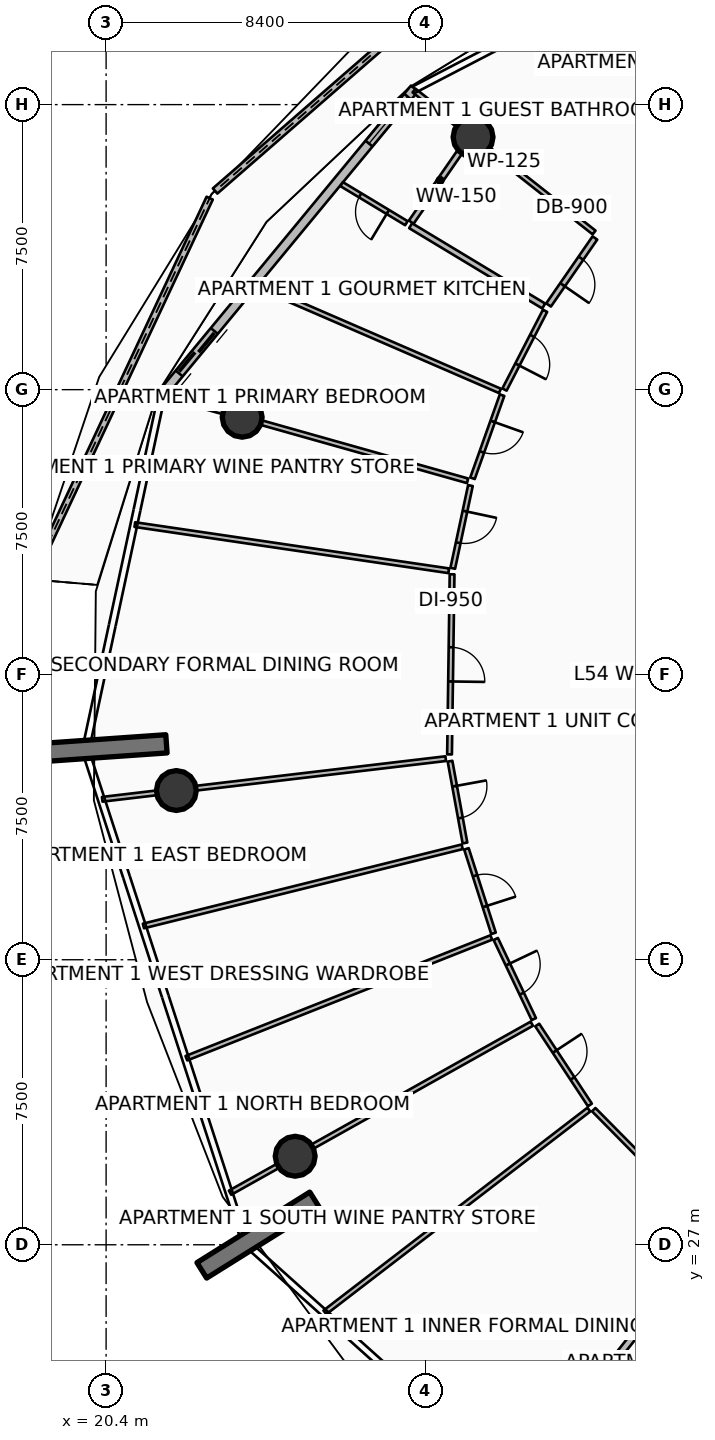
"""IFC4 building model, lengths in metres.
Left out: names, types, materials, properties, quantities, classifications, styles, units other than length and angle.
Written with IfcOpenShell. Run it as: python <this file> out.ifc"""

import sys

from ifc_helpers import new_model, si_unit, direction, frame, frame_2d, origin, origin_2d, place, context, subcontext, project, spatial, polyline, rectangle, circle, outline, extrude, element, fill, save


model = new_model("IFC4")
c1 = context("Model", 3, precision=1e-05, world=origin(), true_north=direction((0.0, 1.0)))
c2 = subcontext(c1, "Body", "Model", "MODEL_VIEW")
j1 = project(units=[si_unit("LENGTHUNIT", "METRE"), si_unit("PLANEANGLEUNIT", "RADIAN")], contexts=[c1])
p1 = place(None, origin())
s1 = spatial("IfcSite", under=j1, at=p1, CompositionType="ELEMENT")
p2 = place(p1, origin())
s2 = spatial("IfcBuilding", under=s1, at=p2, CompositionType="ELEMENT")
p3 = place(p2, frame((0.0, 0.0, 214.05)))
s3 = spatial("IfcBuildingStorey", under=s2, at=p3, CompositionType="ELEMENT", Elevation=214.05)
p4 = place(p3, frame((21.987, 40.181, 0.0), z_axis=(0.0, 0.0, 1.0), x_axis=(-0.997568676264, -0.069690287244, 0.0)))
e1 = element("IfcWall", 1, at=p4, inside=s3, PredefinedType="SOLIDWALL", context=c2, shape_type="SweptSolid", body=[
    extrude(rectangle(XDim=3.5, YDim=0.48, at=frame_2d((1.75, 0.0))), origin(), (0.0, 0.0, 1.0), 3.75),
])
p5 = place(p3, frame((25.886, 28.182, 0.0), z_axis=(0.0, 0.0, 1.0), x_axis=(-0.848033572426, -0.529942506352, 0.0)))
e2 = element("IfcWall", 2, at=p5, inside=s3, PredefinedType="SOLIDWALL", context=c2, shape_type="SweptSolid", body=[
    extrude(rectangle(XDim=3.5, YDim=0.48, at=frame_2d((1.75, 0.0))), origin(), (0.0, 0.0, 1.0), 3.75),
])
for number, where, z_axis, x_axis in (
    (3, (30.056, 56.146, 0.0), (0.0, 0.0, 1.0), (1.0, 0.0, 0.0)),
    (4, (23.98, 48.774, 0.0), (0.0, 0.0, 1.0), (1.0, 0.0, 0.0)),
    (5, (22.248, 38.952, 0.0), (0.0, 0.0, 1.0), (1.0, 0.0, 0.0)),
    (6, (25.375, 29.329, 0.0), (0.0, 0.0, 1.0), (1.0, 0.0, 0.0)),
):
    element("IfcColumn", number, at=place(p3, frame(where, z_axis=z_axis, x_axis=x_axis)), inside=s3, PredefinedType="COLUMN", context=c2, shape_type="SweptSolid", body=[
        extrude(circle(Radius=0.525, at=origin_2d()), origin(), (0.0, 0.0, 1.0), 3.5),
    ])
p6 = place(p3, frame((31.098, 61.546, 0.0), z_axis=(0.0, 0.0, 1.0), x_axis=(-0.754130048188, -0.65672511024, 0.0)))
e7 = element("IfcWall", 7, at=p6, inside=s3, PredefinedType="PARAPET", context=c2, shape_type="SweptSolid", body=[
    extrude(outline(polyline([(0.0, 0.0), (10.384, 0.0), (10.384, 1.148), (5.192, 1.284), (0.0, 1.483), (0.0, 0.0)])), frame((0.0, 0.09, 0.0), z_axis=(0.0, -1.0, 0.0), x_axis=(1.0, 0.0, 0.0)), (0.0, 0.0, 1.0), 0.18),
])
p7 = place(p3, frame((23.126, 54.539, 0.0), z_axis=(0.0, 0.0, 1.0), x_axis=(-0.424187068479, -0.90557458607, 0.0)))
e8 = element("IfcWall", 8, at=p7, inside=s3, PredefinedType="PARAPET", context=c2, shape_type="SweptSolid", body=[
    extrude(outline(polyline([(0.0, 0.0), (11.076, 0.0), (11.076, 1.224), (5.538, 1.127), (0.0, 1.148), (0.0, 0.0)])), frame((0.0, 0.09, 0.0), z_axis=(0.0, -1.0, 0.0), x_axis=(1.0, 0.0, 0.0)), (0.0, 0.0, 1.0), 0.18),
])
p8 = place(p3, frame((28.515, 57.424, 0.0), z_axis=(0.0, 0.0, 1.0), x_axis=(-0.636759394418, -0.771062561418, 0.0)))
e9 = element("IfcWall", 9, at=p8, inside=s3, PredefinedType="SOLIDWALL", context=c2, shape_type="SweptSolid", body=[
    extrude(rectangle(XDim=10.494, YDim=0.24, at=frame_2d((5.247, 0.0))), origin(), (0.0, 0.0, 1.0), 2.45),
])
p9 = place(p8, frame((8.274, 0.0, 0.0)))
e10 = element("IfcOpeningElement", 10, at=p9, cuts=e9, PredefinedType="OPENING", context=c2, shape_type="SweptSolid", body=[
    extrude(rectangle(XDim=1.45, YDim=2.15, at=frame_2d((0.725, 1.075))), frame((0.0, 0.13, 0.0), z_axis=(0.0, -1.0, 0.0), x_axis=(1.0, 0.0, 0.0)), (0.0, 0.0, 1.0), 0.26),
])
p10 = place(p8, frame((0.28, 0.0, 0.65)))
e11 = element("IfcOpeningElement", 11, at=p10, cuts=e9, PredefinedType="OPENING", context=c2, shape_type="SweptSolid", body=[
    extrude(rectangle(XDim=1.6, YDim=1.5, at=frame_2d((0.8, 0.75))), frame((0.0, 0.13, 0.0), z_axis=(0.0, -1.0, 0.0), x_axis=(1.0, 0.0, 0.0)), (0.0, 0.0, 1.0), 0.26),
])
p11 = place(p3, frame((41.113, 33.264, 0.0), z_axis=(0.0, 0.0, 1.0), x_axis=(-0.619089233189, -0.785320648748, 0.0)))
e12 = element("IfcWall", 12, at=p11, inside=s3, PredefinedType="PARTITIONING", context=c2, shape_type="SweptSolid", body=[
    extrude(rectangle(XDim=16.006, YDim=0.18, at=frame_2d((8.003, 0.0))), origin(), (0.0, 0.0, 1.0), 2.94),
])
p12 = place(p3, frame((33.241, 53.635, 0.0), z_axis=(0.0, 0.0, 1.0), x_axis=(-0.785321754625, 0.619087830371, 0.0)))
e13 = element("IfcWall", 13, at=p12, inside=s3, PredefinedType="PARTITIONING", context=c2, shape_type="SweptSolid", body=[
    extrude(rectangle(XDim=6.033, YDim=0.125, at=frame_2d((3.017, 0.0))), origin(), (0.0, 0.0, 1.0), 2.94),
])
p13 = place(p3, frame((33.262, 53.491, 0.0), z_axis=(0.0, 0.0, 1.0), x_axis=(-0.568919673568, -0.822393096413, 0.0)))
e14 = element("IfcWall", 14, at=p13, inside=s3, PredefinedType="PARTITIONING", context=c2, shape_type="SweptSolid", body=[
    extrude(rectangle(XDim=2.143, YDim=0.15, at=frame_2d((1.072, 0.0))), origin(), (0.0, 0.0, 1.0), 2.94),
])
p14 = place(p13, frame((0.646, 0.0, 0.0)))
e15 = element("IfcOpeningElement", 15, at=p14, cuts=e14, PredefinedType="OPENING", context=c2, shape_type="SweptSolid", body=[
    extrude(rectangle(XDim=0.85, YDim=2.06, at=frame_2d((0.425, 1.03))), frame((0.0, 0.085, 0.0), z_axis=(0.0, -1.0, 0.0), x_axis=(1.0, 0.0, 0.0)), (0.0, 0.0, 1.0), 0.17),
])
p15 = place(p3, frame((29.948, 56.104, 0.0), z_axis=(0.0, 0.0, 1.0), x_axis=(-0.568843740651, -0.822445620526, 0.0)))
e16 = element("IfcWall", 16, at=p15, inside=s3, PredefinedType="PARTITIONING", context=c2, shape_type="SweptSolid", body=[
    extrude(rectangle(XDim=2.669, YDim=0.15, at=frame_2d((1.335, 0.0))), origin(), (0.0, 0.0, 1.0), 2.94),
])
p16 = place(p3, frame((31.915, 51.701, 0.0), z_axis=(0.0, 0.0, 1.0), x_axis=(-0.856305556185, 0.516469548422, 0.0)))
e17 = element("IfcWall", 17, at=p16, inside=s3, PredefinedType="PARTITIONING", context=c2, shape_type="SweptSolid", body=[
    extrude(rectangle(XDim=4.09, YDim=0.15, at=frame_2d((2.045, 0.0))), origin(), (0.0, 0.0, 1.0), 2.94),
])
p17 = place(p3, frame((28.302, 53.881, 0.0), z_axis=(0.0, 0.0, 1.0), x_axis=(-0.856354175531, 0.516388929056, 0.0)))
e18 = element("IfcWall", 18, at=p17, inside=s3, PredefinedType="PARTITIONING", context=c2, shape_type="SweptSolid", body=[
    extrude(rectangle(XDim=1.99, YDim=0.125, at=frame_2d((0.995, 0.0))), origin(), (0.0, 0.0, 1.0), 2.94),
])
p18 = place(p17, frame((0.57, 0.0, 0.0)))
e19 = element("IfcOpeningElement", 19, at=p18, cuts=e18, PredefinedType="OPENING", context=c2, shape_type="SweptSolid", body=[
    extrude(rectangle(XDim=0.85, YDim=2.06, at=frame_2d((0.425, 1.03))), frame((0.0, 0.073, 0.0), z_axis=(0.0, -1.0, 0.0), x_axis=(1.0, 0.0, 0.0)), (0.0, 0.0, 1.0), 0.145),
])
p19 = place(p3, frame((30.764, 49.467, 0.0), z_axis=(0.0, 0.0, 1.0), x_axis=(-0.917605566125, 0.397492169755, 0.0)))
e20 = element("IfcWall", 20, at=p19, inside=s3, PredefinedType="PARTITIONING", context=c2, shape_type="SweptSolid", body=[
    extrude(rectangle(XDim=6.955, YDim=0.125, at=frame_2d((3.477, 0.0))), origin(), (0.0, 0.0, 1.0), 2.94),
])
p20 = place(p3, frame((31.951, 51.575, 0.0), z_axis=(0.0, 0.0, 1.0), x_axis=(-0.458029312051, -0.88893708962, 0.0)))
e21 = element("IfcWall", 21, at=p20, inside=s3, PredefinedType="PARTITIONING", context=c2, shape_type="SweptSolid", body=[
    extrude(rectangle(XDim=2.332, YDim=0.125, at=frame_2d((1.166, 0.0))), origin(), (0.0, 0.0, 1.0), 2.94),
])
p21 = place(p20, frame((0.741, 0.0, 0.0)))
e22 = element("IfcOpeningElement", 22, at=p21, cuts=e21, PredefinedType="OPENING", context=c2, shape_type="SweptSolid", body=[
    extrude(rectangle(XDim=0.85, YDim=2.06, at=frame_2d((0.425, 1.03))), frame((0.0, 0.073, 0.0), z_axis=(0.0, -1.0, 0.0), x_axis=(1.0, 0.0, 0.0)), (0.0, 0.0, 1.0), 0.145),
])
p22 = place(p3, frame((30.82, 49.356, 0.0), z_axis=(0.0, 0.0, 1.0), x_axis=(-0.335156966619, -0.942162304344, 0.0)))
e23 = element("IfcWall", 23, at=p22, inside=s3, PredefinedType="PARTITIONING", context=c2, shape_type="SweptSolid", body=[
    extrude(rectangle(XDim=2.322, YDim=0.125, at=frame_2d((1.161, 0.0))), origin(), (0.0, 0.0, 1.0), 2.94),
])
p23 = place(p22, frame((0.736, 0.0, 0.0)))
e24 = element("IfcOpeningElement", 24, at=p23, cuts=e23, PredefinedType="OPENING", context=c2, shape_type="SweptSolid", body=[
    extrude(rectangle(XDim=0.85, YDim=2.06, at=frame_2d((0.425, 1.03))), frame((0.0, 0.073, 0.0), z_axis=(0.0, -1.0, 0.0), x_axis=(1.0, 0.0, 0.0)), (0.0, 0.0, 1.0), 0.145),
])
p24 = place(p3, frame((29.912, 47.101, 0.0), z_axis=(0.0, 0.0, 1.0), x_axis=(-0.962449080254, 0.271462277156, 0.0)))
e25 = element("IfcWall", 25, at=p24, inside=s3, PredefinedType="PARTITIONING", context=c2, shape_type="SweptSolid", body=[
    extrude(rectangle(XDim=8.236, YDim=0.125, at=frame_2d((4.118, 0.0))), origin(), (0.0, 0.0, 1.0), 2.94),
])
p25 = place(p3, frame((29.416, 44.734, 0.0), z_axis=(0.0, 0.0, 1.0), x_axis=(-0.989347742189, 0.145571443031, 0.0)))
e26 = element("IfcWall", 26, at=p25, inside=s3, PredefinedType="PARTITIONING", context=c2, shape_type="SweptSolid", body=[
    extrude(rectangle(XDim=8.349, YDim=0.125, at=frame_2d((4.174, 0.0))), origin(), (0.0, 0.0, 1.0), 2.94),
])
p26 = place(p3, frame((29.987, 46.977, 0.0), z_axis=(0.0, 0.0, 1.0), x_axis=(-0.209004848165, -0.977914604372, 0.0)))
e27 = element("IfcWall", 27, at=p26, inside=s3, PredefinedType="PARTITIONING", context=c2, shape_type="SweptSolid", body=[
    extrude(rectangle(XDim=2.226, YDim=0.125, at=frame_2d((1.113, 0.0))), origin(), (0.0, 0.0, 1.0), 2.94),
])
p27 = place(p26, frame((0.688, 0.0, 0.0)))
e28 = element("IfcOpeningElement", 28, at=p27, cuts=e27, PredefinedType="OPENING", context=c2, shape_type="SweptSolid", body=[
    extrude(rectangle(XDim=0.85, YDim=2.06, at=frame_2d((0.425, 1.03))), frame((0.0, 0.073, 0.0), z_axis=(0.0, -1.0, 0.0), x_axis=(1.0, 0.0, 0.0)), (0.0, 0.0, 1.0), 0.145),
])
p28 = place(p3, frame((29.504, 44.641, 0.0), z_axis=(0.0, 0.0, 1.0), x_axis=(-0.014116482788, -0.999900357493, 0.0)))
e29 = element("IfcWall", 29, at=p28, inside=s3, PredefinedType="PARTITIONING", context=c2, shape_type="SweptSolid", body=[
    extrude(rectangle(XDim=4.739, YDim=0.125, at=frame_2d((2.369, 0.0))), origin(), (0.0, 0.0, 1.0), 2.94),
])
p29 = place(p28, frame((1.919, 0.0, 0.0)))
e30 = element("IfcOpeningElement", 30, at=p29, cuts=e29, PredefinedType="OPENING", context=c2, shape_type="SweptSolid", body=[
    extrude(rectangle(XDim=0.9, YDim=2.08, at=frame_2d((0.45, 1.04))), frame((0.0, 0.073, 0.0), z_axis=(0.0, -1.0, 0.0), x_axis=(1.0, 0.0, 0.0)), (0.0, 0.0, 1.0), 0.145),
])
p30 = place(p3, frame((29.336, 39.791, 0.0), z_axis=(0.0, 0.0, 1.0), x_axis=(-0.99306722244, -0.117547827356, 0.0)))
e31 = element("IfcWall", 31, at=p30, inside=s3, PredefinedType="PARTITIONING", context=c2, shape_type="SweptSolid", body=[
    extrude(rectangle(XDim=9.101, YDim=0.125, at=frame_2d((4.551, 0.0))), origin(), (0.0, 0.0, 1.0), 2.94),
])
p31 = place(p3, frame((29.77, 37.472, 0.0), z_axis=(0.0, 0.0, 1.0), x_axis=(-0.970505283608, -0.241079850857, 0.0)))
e32 = element("IfcWall", 32, at=p31, inside=s3, PredefinedType="PARTITIONING", context=c2, shape_type="SweptSolid", body=[
    extrude(rectangle(XDim=8.643, YDim=0.125, at=frame_2d((4.322, 0.0))), origin(), (0.0, 0.0, 1.0), 2.94),
])
p32 = place(p3, frame((30.535, 35.085, 0.0), z_axis=(0.0, 0.0, 1.0), x_axis=(-0.929776352491, -0.368124889607, 0.0)))
e33 = element("IfcWall", 33, at=p32, inside=s3, PredefinedType="PARTITIONING", context=c2, shape_type="SweptSolid", body=[
    extrude(rectangle(XDim=8.629, YDim=0.125, at=frame_2d((4.314, 0.0))), origin(), (0.0, 0.0, 1.0), 2.94),
])
p33 = place(p3, frame((29.45, 39.724, 0.0), z_axis=(0.0, 0.0, 1.0), x_axis=(0.179671023407, -0.98372675238, 0.0)))
e34 = element("IfcWall", 34, at=p33, inside=s3, PredefinedType="PARTITIONING", context=c2, shape_type="SweptSolid", body=[
    extrude(rectangle(XDim=2.188, YDim=0.125, at=frame_2d((1.094, 0.0))), origin(), (0.0, 0.0, 1.0), 2.94),
])
p34 = place(p33, frame((0.669, 0.0, 0.0)))
e35 = element("IfcOpeningElement", 35, at=p34, cuts=e34, PredefinedType="OPENING", context=c2, shape_type="SweptSolid", body=[
    extrude(rectangle(XDim=0.85, YDim=2.06, at=frame_2d((0.425, 1.03))), frame((0.0, 0.073, 0.0), z_axis=(0.0, -1.0, 0.0), x_axis=(1.0, 0.0, 0.0)), (0.0, 0.0, 1.0), 0.145),
])
p35 = place(p3, frame((29.882, 37.417, 0.0), z_axis=(0.0, 0.0, 1.0), x_axis=(0.305348810802, -0.952240570309, 0.0)))
e36 = element("IfcWall", 36, at=p35, inside=s3, PredefinedType="PARTITIONING", context=c2, shape_type="SweptSolid", body=[
    extrude(rectangle(XDim=2.334, YDim=0.125, at=frame_2d((1.167, 0.0))), origin(), (0.0, 0.0, 1.0), 2.94),
])
p36 = place(p35, frame((0.742, 0.0, 0.0)))
e37 = element("IfcOpeningElement", 37, at=p36, cuts=e36, PredefinedType="OPENING", context=c2, shape_type="SweptSolid", body=[
    extrude(rectangle(XDim=0.85, YDim=2.06, at=frame_2d((0.425, 1.03))), frame((0.0, 0.073, 0.0), z_axis=(0.0, -1.0, 0.0), x_axis=(1.0, 0.0, 0.0)), (0.0, 0.0, 1.0), 0.145),
])
p37 = place(p3, frame((30.653, 35.046, 0.0), z_axis=(0.0, 0.0, 1.0), x_axis=(0.429385363207, -0.903121370506, 0.0)))
e38 = element("IfcWall", 38, at=p37, inside=s3, PredefinedType="PARTITIONING", context=c2, shape_type="SweptSolid", body=[
    extrude(rectangle(XDim=2.334, YDim=0.125, at=frame_2d((1.167, 0.0))), origin(), (0.0, 0.0, 1.0), 2.94),
])
p38 = place(p37, frame((0.742, 0.0, 0.0)))
e39 = element("IfcOpeningElement", 39, at=p38, cuts=e38, PredefinedType="OPENING", context=c2, shape_type="SweptSolid", body=[
    extrude(rectangle(XDim=0.85, YDim=2.06, at=frame_2d((0.425, 1.03))), frame((0.0, 0.073, 0.0), z_axis=(0.0, -1.0, 0.0), x_axis=(1.0, 0.0, 0.0)), (0.0, 0.0, 1.0), 0.145),
])
p39 = place(p3, frame((31.602, 32.817, 0.0), z_axis=(0.0, 0.0, 1.0), x_axis=(-0.872494579812, -0.488623790047, 0.0)))
e40 = element("IfcWall", 40, at=p39, inside=s3, PredefinedType="PARTITIONING", context=c2, shape_type="SweptSolid", body=[
    extrude(rectangle(XDim=9.101, YDim=0.125, at=frame_2d((4.551, 0.0))), origin(), (0.0, 0.0, 1.0), 2.94),
])
p40 = place(p3, frame((33.104, 30.557, 0.0), z_axis=(0.0, 0.0, 1.0), x_axis=(-0.793029985802, -0.609182601212, 0.0)))
e41 = element("IfcWall", 41, at=p40, inside=s3, PredefinedType="PARTITIONING", context=c2, shape_type="SweptSolid", body=[
    extrude(rectangle(XDim=8.759, YDim=0.125, at=frame_2d((4.38, 0.0))), origin(), (0.0, 0.0, 1.0), 2.94),
])
p41 = place(p3, frame((31.745, 32.782, 0.0), z_axis=(0.0, 0.0, 1.0), x_axis=(0.550331787139, -0.834946060572, 0.0)))
e42 = element("IfcWall", 42, at=p41, inside=s3, PredefinedType="PARTITIONING", context=c2, shape_type="SweptSolid", body=[
    extrude(rectangle(XDim=2.519, YDim=0.125, at=frame_2d((1.26, 0.0))), origin(), (0.0, 0.0, 1.0), 2.94),
])
p42 = place(p41, frame((0.835, 0.0, 0.0)))
e43 = element("IfcOpeningElement", 43, at=p42, cuts=e42, PredefinedType="OPENING", context=c2, shape_type="SweptSolid", body=[
    extrude(rectangle(XDim=0.85, YDim=2.06, at=frame_2d((0.425, 1.03))), frame((0.0, 0.073, 0.0), z_axis=(0.0, -1.0, 0.0), x_axis=(1.0, 0.0, 0.0)), (0.0, 0.0, 1.0), 0.145),
])
p43 = place(p3, frame((33.231, 30.555, 0.0), z_axis=(0.0, 0.0, 1.0), x_axis=(0.702646714281, -0.711538892057, 0.0)))
e44 = element("IfcWall", 44, at=p43, inside=s3, PredefinedType="PARTITIONING", context=c2, shape_type="SweptSolid", body=[
    extrude(rectangle(XDim=4.448, YDim=0.125, at=frame_2d((2.224, 0.0))), origin(), (0.0, 0.0, 1.0), 2.94),
])
p44 = place(p43, frame((1.774, 0.0, 0.0)))
e45 = element("IfcOpeningElement", 45, at=p44, cuts=e44, PredefinedType="OPENING", context=c2, shape_type="SweptSolid", body=[
    extrude(rectangle(XDim=0.9, YDim=2.08, at=frame_2d((0.45, 1.04))), frame((0.0, 0.073, 0.0), z_axis=(0.0, -1.0, 0.0), x_axis=(1.0, 0.0, 0.0)), (0.0, 0.0, 1.0), 0.145),
])
p45 = place(p9, origin())
e46 = element("IfcDoor", 46, at=p45, inside=s3, OperationType="DOUBLE_DOOR_SLIDING", PredefinedType="DOOR", context=c2, shape_type="SweptSolid", body=[
    extrude(rectangle(XDim=1.45, YDim=2.15, at=frame_2d((0.725, 1.075))), frame((0.0, 0.025, 0.0), z_axis=(0.0, -1.0, 0.0), x_axis=(1.0, 0.0, 0.0)), (0.0, 0.0, 1.0), 0.05),
])
fill(e10, e46)
p46 = place(p10, origin())
e47 = element("IfcWindow", 47, at=p46, inside=s3, PartitioningType="SINGLE_PANEL", PredefinedType="WINDOW", context=c2, shape_type="SweptSolid", body=[
    extrude(rectangle(XDim=1.6, YDim=1.5, at=frame_2d((0.8, 0.75))), frame((0.0, 0.03, 0.0), z_axis=(0.0, -1.0, 0.0), x_axis=(1.0, 0.0, 0.0)), (0.0, 0.0, 1.0), 0.06),
])
fill(e11, e47)
p47 = place(p14, origin())
e48 = element("IfcDoor", 48, at=p47, inside=s3, OperationType="SINGLE_SWING_RIGHT", PredefinedType="DOOR", context=c2, shape_type="SweptSolid", body=[
    extrude(rectangle(XDim=0.85, YDim=2.06, at=frame_2d((0.425, 1.03))), frame((0.0, 0.025, 0.0), z_axis=(0.0, -1.0, 0.0), x_axis=(1.0, 0.0, 0.0)), (0.0, 0.0, 1.0), 0.05),
])
fill(e15, e48)
p48 = place(p18, origin())
e49 = element("IfcDoor", 49, at=p48, inside=s3, OperationType="SINGLE_SWING_LEFT", PredefinedType="DOOR", context=c2, shape_type="SweptSolid", body=[
    extrude(rectangle(XDim=0.85, YDim=2.06, at=frame_2d((0.425, 1.03))), frame((0.0, 0.025, 0.0), z_axis=(0.0, -1.0, 0.0), x_axis=(1.0, 0.0, 0.0)), (0.0, 0.0, 1.0), 0.05),
])
fill(e19, e49)
p49 = place(p21, origin())
e50 = element("IfcDoor", 50, at=p49, inside=s3, OperationType="SINGLE_SWING_RIGHT", PredefinedType="DOOR", context=c2, shape_type="SweptSolid", body=[
    extrude(rectangle(XDim=0.85, YDim=2.06, at=frame_2d((0.425, 1.03))), frame((0.0, 0.025, 0.0), z_axis=(0.0, -1.0, 0.0), x_axis=(1.0, 0.0, 0.0)), (0.0, 0.0, 1.0), 0.05),
])
fill(e22, e50)
p50 = place(p23, origin())
e51 = element("IfcDoor", 51, at=p50, inside=s3, OperationType="SINGLE_SWING_LEFT", PredefinedType="DOOR", context=c2, shape_type="SweptSolid", body=[
    extrude(rectangle(XDim=0.85, YDim=2.06, at=frame_2d((0.425, 1.03))), frame((0.0, 0.025, 0.0), z_axis=(0.0, -1.0, 0.0), x_axis=(1.0, 0.0, 0.0)), (0.0, 0.0, 1.0), 0.05),
])
fill(e24, e51)
p51 = place(p27, origin())
e52 = element("IfcDoor", 52, at=p51, inside=s3, OperationType="SINGLE_SWING_LEFT", PredefinedType="DOOR", context=c2, shape_type="SweptSolid", body=[
    extrude(rectangle(XDim=0.85, YDim=2.06, at=frame_2d((0.425, 1.03))), frame((0.0, 0.025, 0.0), z_axis=(0.0, -1.0, 0.0), x_axis=(1.0, 0.0, 0.0)), (0.0, 0.0, 1.0), 0.05),
])
fill(e28, e52)
p52 = place(p29, origin())
e53 = element("IfcDoor", 53, at=p52, inside=s3, OperationType="SINGLE_SWING_RIGHT", PredefinedType="DOOR", context=c2, shape_type="SweptSolid", body=[
    extrude(rectangle(XDim=0.9, YDim=2.08, at=frame_2d((0.45, 1.04))), frame((0.0, 0.025, 0.0), z_axis=(0.0, -1.0, 0.0), x_axis=(1.0, 0.0, 0.0)), (0.0, 0.0, 1.0), 0.05),
])
fill(e30, e53)
p53 = place(p34, origin())
e54 = element("IfcDoor", 54, at=p53, inside=s3, OperationType="SINGLE_SWING_LEFT", PredefinedType="DOOR", context=c2, shape_type="SweptSolid", body=[
    extrude(rectangle(XDim=0.85, YDim=2.06, at=frame_2d((0.425, 1.03))), frame((0.0, 0.025, 0.0), z_axis=(0.0, -1.0, 0.0), x_axis=(1.0, 0.0, 0.0)), (0.0, 0.0, 1.0), 0.05),
])
fill(e35, e54)
p54 = place(p36, origin())
e55 = element("IfcDoor", 55, at=p54, inside=s3, OperationType="SINGLE_SWING_RIGHT", PredefinedType="DOOR", context=c2, shape_type="SweptSolid", body=[
    extrude(rectangle(XDim=0.85, YDim=2.06, at=frame_2d((0.425, 1.03))), frame((0.0, 0.025, 0.0), z_axis=(0.0, -1.0, 0.0), x_axis=(1.0, 0.0, 0.0)), (0.0, 0.0, 1.0), 0.05),
])
fill(e37, e55)
p55 = place(p38, origin())
e56 = element("IfcDoor", 56, at=p55, inside=s3, OperationType="SINGLE_SWING_LEFT", PredefinedType="DOOR", context=c2, shape_type="SweptSolid", body=[
    extrude(rectangle(XDim=0.85, YDim=2.06, at=frame_2d((0.425, 1.03))), frame((0.0, 0.025, 0.0), z_axis=(0.0, -1.0, 0.0), x_axis=(1.0, 0.0, 0.0)), (0.0, 0.0, 1.0), 0.05),
])
fill(e39, e56)
p56 = place(p42, origin())
e57 = element("IfcDoor", 57, at=p56, inside=s3, OperationType="SINGLE_SWING_LEFT", PredefinedType="DOOR", context=c2, shape_type="SweptSolid", body=[
    extrude(rectangle(XDim=0.85, YDim=2.06, at=frame_2d((0.425, 1.03))), frame((0.0, 0.025, 0.0), z_axis=(0.0, -1.0, 0.0), x_axis=(1.0, 0.0, 0.0)), (0.0, 0.0, 1.0), 0.05),
])
fill(e43, e57)
save(model, sys.argv[1])
